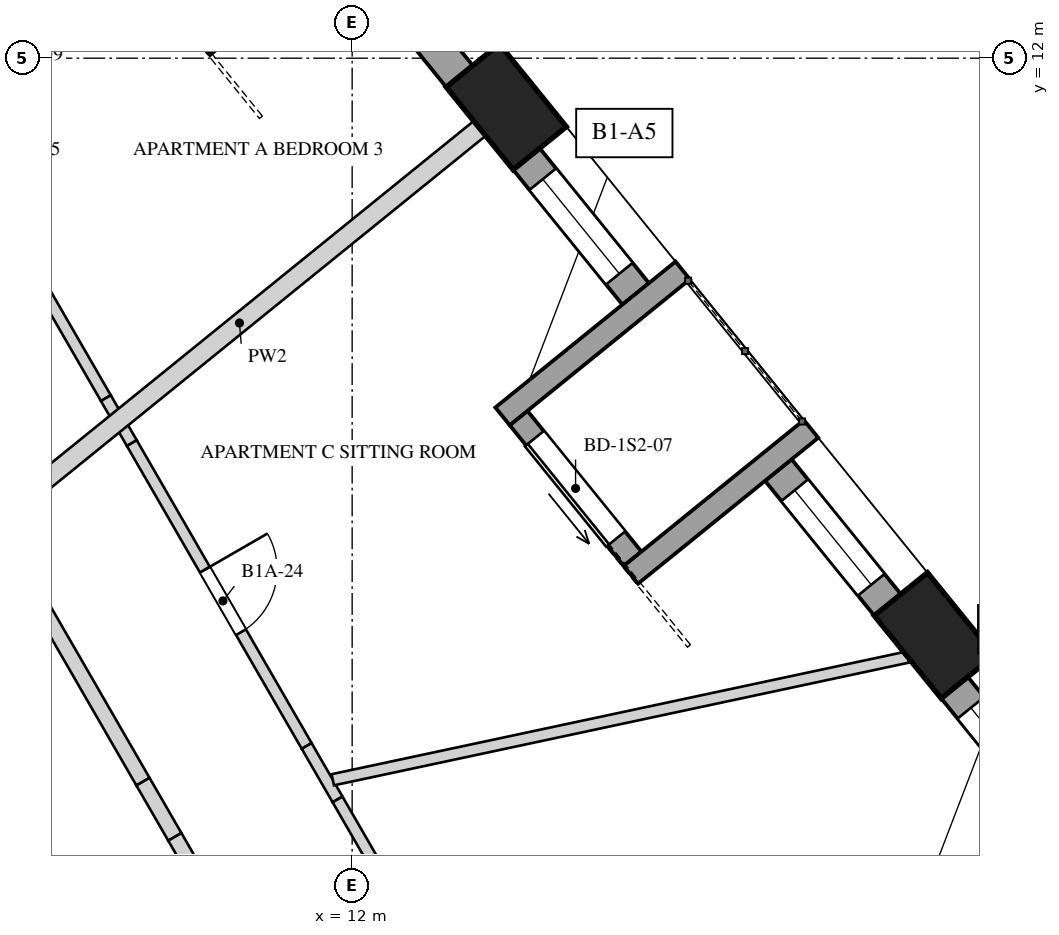
"""IFC4 building model, lengths in metres.
Left out: names, types, materials, properties, quantities, classifications, styles, units other than length and angle.
Written with IfcOpenShell. Run it as: python <this file> out.ifc"""

import sys

from ifc_helpers import new_model, si_unit, direction, frame, frame_2d, origin, origin_2d, place, context, subcontext, project, spatial, rectangle, extrude, element, fill, save


model = new_model("IFC4")
c1 = context("Model", 3, precision=1e-05, world=origin(), true_north=direction((0.0, 1.0)))
c2 = subcontext(c1, "Body", "Model", "MODEL_VIEW")
j1 = project(units=[si_unit("LENGTHUNIT", "METRE"), si_unit("PLANEANGLEUNIT", "RADIAN")], contexts=[c1])
p1 = place(None, origin())
s1 = spatial("IfcSite", under=j1, at=p1, CompositionType="ELEMENT")
p2 = place(p1, origin())
s2 = spatial("IfcBuilding", under=s1, at=p2, CompositionType="ELEMENT")
p3 = place(p2, frame((0.0, 0.0, 51.2)))
s3 = spatial("IfcBuildingStorey", under=s2, at=p3, CompositionType="ELEMENT", Elevation=51.2)
p4 = place(p3, frame((9.642, -4.25, 0.0), z_axis=(0.0, 0.0, 1.0), x_axis=(-0.499985955615, 0.866033512162, 0.0)))
e1 = element("IfcWall", 1, at=p4, inside=s3, PredefinedType="SHEAR", context=c2, shape_type="SweptSolid", body=[
    extrude(rectangle(XDim=17.003, YDim=1.05, at=frame_2d((8.501, 0.0))), origin(), (0.0, 0.0, 1.0), 4.0),
])
p5 = place(p4, frame((6.776, 0.0, 0.0)))
e2 = element("IfcOpeningElement", 2, at=p5, cuts=e1, PredefinedType="OPENING", context=c2, shape_type="SweptSolid", body=[
    extrude(rectangle(XDim=1.0, YDim=2.4, at=frame_2d((0.5, 1.2))), frame((0.0, 0.535, 0.0), z_axis=(0.0, -1.0, 0.0), x_axis=(1.0, 0.0, 0.0)), (0.0, 0.0, 1.0), 1.07),
])
for number, where, z_axis, x_axis in (
    (3, (19.659, 4.405, -0.35), (0.0, 0.0, 1.0), (-0.629, 0.777, 0.0)),
    (4, (14.028, 11.359, -0.35), (0.0, 0.0, 1.0), (-0.629, 0.777, 0.0)),
):
    element("IfcColumn", number, at=place(p3, frame(where, z_axis=z_axis, x_axis=x_axis)), inside=s3, PredefinedType="COLUMN", context=c2, shape_type="SweptSolid", body=[
        extrude(rectangle(XDim=1.4, YDim=0.9, at=origin_2d()), origin(), (0.0, 0.0, 1.0), 4.35),
    ])
p6 = place(p3, frame((21.362, 1.945, 0.0), z_axis=(0.0, 0.0, 1.0), x_axis=(-0.629339730135, 0.777130300576, 0.0)))
e5 = element("IfcWall", 5, at=p6, inside=s3, PredefinedType="SOLIDWALL", context=c2, shape_type="SweptSolid", body=[
    extrude(rectangle(XDim=2.283, YDim=0.45, at=frame_2d((1.142, 0.0))), origin(), (0.0, 0.0, 1.0), 3.3),
])
p7 = place(p6, frame((0.342, 0.0, 0.7)))
e6 = element("IfcOpeningElement", 6, at=p7, cuts=e5, PredefinedType="OPENING", context=c2, shape_type="SweptSolid", body=[
    extrude(rectangle(XDim=1.6, YDim=2.3, at=frame_2d((0.8, 1.15))), frame((0.0, 0.235, 0.0), z_axis=(0.0, -1.0, 0.0), x_axis=(1.0, 0.0, 0.0)), (0.0, 0.0, 1.0), 0.47),
])
p8 = place(p3, frame((19.044, 4.807, 0.0), z_axis=(0.0, 0.0, 1.0), x_axis=(-0.629339730135, 0.777130300576, 0.0)))
e7 = element("IfcWall", 7, at=p8, inside=s3, PredefinedType="SOLIDWALL", context=c2, shape_type="SweptSolid", body=[
    extrude(rectangle(XDim=2.283, YDim=0.45, at=frame_2d((1.142, 0.0))), origin(), (0.0, 0.0, 1.0), 3.3),
])
p9 = place(p8, frame((0.342, 0.0, 0.7)))
e8 = element("IfcOpeningElement", 8, at=p9, cuts=e7, PredefinedType="OPENING", context=c2, shape_type="SweptSolid", body=[
    extrude(rectangle(XDim=1.6, YDim=2.3, at=frame_2d((0.8, 1.15))), frame((0.0, 0.235, 0.0), z_axis=(0.0, -1.0, 0.0), x_axis=(1.0, 0.0, 0.0)), (0.0, 0.0, 1.0), 0.47),
])
p10 = place(p3, frame((15.73, 8.899, 0.0), z_axis=(0.0, 0.0, 1.0), x_axis=(-0.629339730135, 0.777130300576, 0.0)))
e9 = element("IfcWall", 9, at=p10, inside=s3, PredefinedType="SOLIDWALL", context=c2, shape_type="SweptSolid", body=[
    extrude(rectangle(XDim=2.283, YDim=0.45, at=frame_2d((1.142, 0.0))), origin(), (0.0, 0.0, 1.0), 3.3),
])
p11 = place(p10, frame((0.342, 0.0, 0.7)))
e10 = element("IfcOpeningElement", 10, at=p11, cuts=e9, PredefinedType="OPENING", context=c2, shape_type="SweptSolid", body=[
    extrude(rectangle(XDim=1.6, YDim=2.3, at=frame_2d((0.8, 1.15))), frame((0.0, 0.235, 0.0), z_axis=(0.0, -1.0, 0.0), x_axis=(1.0, 0.0, 0.0)), (0.0, 0.0, 1.0), 0.47),
])
p12 = place(p3, frame((13.412, 11.762, 0.0), z_axis=(0.0, 0.0, 1.0), x_axis=(-0.629339730135, 0.777130300576, 0.0)))
e11 = element("IfcWall", 11, at=p12, inside=s3, PredefinedType="SOLIDWALL", context=c2, shape_type="SweptSolid", body=[
    extrude(rectangle(XDim=2.283, YDim=0.45, at=frame_2d((1.142, 0.0))), origin(), (0.0, 0.0, 1.0), 3.3),
])
p13 = place(p12, frame((0.642, 0.0, 0.7)))
e12 = element("IfcOpeningElement", 12, at=p13, cuts=e11, PredefinedType="OPENING", context=c2, shape_type="SweptSolid", body=[
    extrude(rectangle(XDim=1.0, YDim=2.3, at=frame_2d((0.5, 1.15))), frame((0.0, 0.235, 0.0), z_axis=(0.0, -1.0, 0.0), x_axis=(1.0, 0.0, 0.0)), (0.0, 0.0, 1.0), 0.47),
])
p14 = place(p3, frame((21.98, 2.253, 0.0), z_axis=(0.0, 0.0, 1.0), x_axis=(-0.777121820661, -0.629350201281, 0.0)))
e13 = element("IfcWall", 13, at=p14, inside=s3, PredefinedType="SOLIDWALL", context=c2, shape_type="SweptSolid", body=[
    extrude(rectangle(XDim=3.05, YDim=0.3, at=frame_2d((1.525, 0.0))), origin(), (0.0, 0.0, 1.0), 3.3),
])
p15 = place(p3, frame((15.689, 5.414, 0.0), z_axis=(0.0, 0.0, 1.0), x_axis=(-0.629319049918, 0.777147047482, 0.0)))
e14 = element("IfcWall", 14, at=p15, inside=s3, PredefinedType="SOLIDWALL", context=c2, shape_type="SweptSolid", body=[
    extrude(rectangle(XDim=2.383, YDim=0.3, at=frame_2d((1.191, 0.0))), origin(), (0.0, 0.0, 1.0), 3.3),
])
p16 = place(p15, frame((0.342, 0.0, 0.0)))
e15 = element("IfcOpeningElement", 15, at=p16, cuts=e14, PredefinedType="OPENING", context=c2, shape_type="SweptSolid", body=[
    extrude(rectangle(XDim=1.7, YDim=2.4, at=frame_2d((0.85, 1.2))), frame((0.0, 0.16, 0.0), z_axis=(0.0, -1.0, 0.0), x_axis=(1.0, 0.0, 0.0)), (0.0, 0.0, 1.0), 0.32),
])
for number, where, z_axis, x_axis in (
    (16, (18.037, 7.123, 0.0), (0.0, 0.0, 1.0), (-0.777, -0.629, 0.0)),
    (17, (16.349, 9.208, 0.0), (0.0, 0.0, 1.0), (-0.777, -0.629, 0.0)),
    (18, (12.406, 14.077, 0.0), (0.0, 0.0, 1.0), (-0.777, -0.629, 0.0)),
):
    element("IfcWall", number, at=place(p3, frame(where, z_axis=z_axis, x_axis=x_axis)), inside=s3, PredefinedType="SOLIDWALL", context=c2, shape_type="SweptSolid", body=[
        extrude(rectangle(XDim=3.05, YDim=0.3, at=frame_2d((1.525, 0.0))), origin(), (0.0, 0.0, 1.0), 3.3),
    ])
p17 = place(p3, frame((6.038, 12.241, 0.0), z_axis=(0.0, 0.0, 1.0), x_axis=(0.500003308737, -0.866023493476, 0.0)))
e19 = element("IfcWall", 19, at=p17, inside=s3, PredefinedType="PARTITIONING", context=c2, shape_type="SweptSolid", body=[
    extrude(rectangle(XDim=5.443, YDim=0.15, at=frame_2d((2.721, 0.0))), origin(), (0.0, 0.0, 1.0), 3.65),
])
p18 = place(p17, frame((1.64, 0.0, 0.0)))
e20 = element("IfcOpeningElement", 20, at=p18, cuts=e19, PredefinedType="OPENING", context=c2, shape_type="SweptSolid", body=[
    extrude(rectangle(XDim=0.95, YDim=2.4, at=frame_2d((0.475, 1.2))), frame((0.0, 0.085, 0.0), z_axis=(0.0, -1.0, 0.0), x_axis=(1.0, 0.0, 0.0)), (0.0, 0.0, 1.0), 0.17),
])
p19 = place(p3, frame((8.76, 7.528, 0.0), z_axis=(0.0, 0.0, 1.0), x_axis=(0.499712146016, -0.866191532586, 0.0)))
e21 = element("IfcWall", 21, at=p19, inside=s3, PredefinedType="PARTITIONING", context=c2, shape_type="SweptSolid", body=[
    extrude(rectangle(XDim=0.684, YDim=0.15, at=frame_2d((0.342, 0.0))), origin(), (0.0, 0.0, 1.0), 2.95),
])
p20 = place(p3, frame((9.101, 6.936, 0.0), z_axis=(0.0, 0.0, 1.0), x_axis=(0.500008794324, -0.866020326319, 0.0)))
e22 = element("IfcWall", 22, at=p20, inside=s3, PredefinedType="PARTITIONING", context=c2, shape_type="SweptSolid", body=[
    extrude(rectangle(XDim=4.601, YDim=0.15, at=frame_2d((2.3, 0.0))), origin(), (0.0, 0.0, 1.0), 3.65),
])
p21 = place(p20, frame((1.922, 0.0, 0.0)))
e23 = element("IfcOpeningElement", 23, at=p21, cuts=e22, PredefinedType="OPENING", context=c2, shape_type="SweptSolid", body=[
    extrude(rectangle(XDim=0.95, YDim=2.4, at=frame_2d((0.475, 1.2))), frame((0.0, 0.085, 0.0), z_axis=(0.0, -1.0, 0.0), x_axis=(1.0, 0.0, 0.0)), (0.0, 0.0, 1.0), 0.17),
])
p22 = place(p3, frame((11.402, 2.952, 0.0), z_axis=(0.0, 0.0, 1.0), x_axis=(0.500147393723, -0.865940289253, 0.0)))
e24 = element("IfcWall", 24, at=p22, inside=s3, PredefinedType="PARTITIONING", context=c2, shape_type="SweptSolid", body=[
    extrude(rectangle(XDim=0.812, YDim=0.15, at=frame_2d((0.406, 0.0))), origin(), (0.0, 0.0, 1.0), 2.75),
])
p23 = place(p3, frame((11.808, 2.248, 0.0), z_axis=(0.0, 0.0, 1.0), x_axis=(0.500002145574, -0.866024165033, 0.0)))
e25 = element("IfcWall", 25, at=p23, inside=s3, PredefinedType="PARTITIONING", context=c2, shape_type="SweptSolid", body=[
    extrude(rectangle(XDim=3.677, YDim=0.15, at=frame_2d((1.839, 0.0))), origin(), (0.0, 0.0, 1.0), 3.65),
])
p24 = place(p23, frame((1.604, 0.0, 0.0)))
e26 = element("IfcOpeningElement", 26, at=p24, cuts=e25, PredefinedType="OPENING", context=c2, shape_type="SweptSolid", body=[
    extrude(rectangle(XDim=0.95, YDim=2.4, at=frame_2d((0.475, 1.2))), frame((0.0, 0.085, 0.0), z_axis=(0.0, -1.0, 0.0), x_axis=(1.0, 0.0, 0.0)), (0.0, 0.0, 1.0), 0.17),
])
p25 = place(p3, frame((11.745, 2.507, 0.0), z_axis=(0.0, 0.0, 1.0), x_axis=(0.97797299527, 0.208731455516, 0.0)))
e27 = element("IfcWall", 27, at=p25, inside=s3, PredefinedType="PARTITIONING", context=c2, shape_type="SweptSolid", body=[
    extrude(rectangle(XDim=7.735, YDim=0.15, at=frame_2d((3.867, 0.0))), origin(), (0.0, 0.0, 1.0), 2.75),
])
p26 = place(p3, frame((13.678, 11.076, 0.0), z_axis=(0.0, 0.0, 1.0), x_axis=(-0.777150492193, -0.629314796015, 0.0)))
e28 = element("IfcWall", 28, at=p26, inside=s3, PredefinedType="SOLIDWALL", context=c2, shape_type="SweptSolid", body=[
    extrude(rectangle(XDim=8.133, YDim=0.25, at=frame_2d((4.067, 0.0))), origin(), (0.0, 0.0, 1.0), 2.95),
])
p27 = place(p3, frame((7.455, 5.587, 0.0), z_axis=(0.0, 0.0, 1.0), x_axis=(0.500013241293, -0.866017758786, 0.0)))
e29 = element("IfcWall", 29, at=p27, inside=s3, PredefinedType="SOLIDWALL", context=c2, shape_type="SweptSolid", body=[
    extrude(rectangle(XDim=3.585, YDim=0.2, at=frame_2d((1.793, 0.0))), origin(), (0.0, 0.0, 1.0), 3.65),
])
p28 = place(p3, frame((9.248, 2.482, 0.0), z_axis=(0.0, 0.0, 1.0), x_axis=(0.500117447933, -0.865957584569, 0.0)))
e30 = element("IfcWall", 30, at=p28, inside=s3, PredefinedType="SOLIDWALL", context=c2, shape_type="SweptSolid", body=[
    extrude(rectangle(XDim=0.838, YDim=0.2, at=frame_2d((0.419, 0.0))), origin(), (0.0, 0.0, 1.0), 2.75),
])
p29 = place(p3, frame((9.667, 1.756, 0.0), z_axis=(0.0, 0.0, 1.0), x_axis=(0.499964529649, -0.866045881633, 0.0)))
e31 = element("IfcWall", 31, at=p29, inside=s3, PredefinedType="SOLIDWALL", context=c2, shape_type="SweptSolid", body=[
    extrude(rectangle(XDim=2.794, YDim=0.2, at=frame_2d((1.397, 0.0))), origin(), (0.0, 0.0, 1.0), 3.65),
])
p30 = place(p7, origin())
e32 = element("IfcWindow", 32, at=p30, inside=s3, PartitioningType="SINGLE_PANEL", PredefinedType="WINDOW", context=c2, shape_type="SweptSolid", body=[
    extrude(rectangle(XDim=1.6, YDim=2.3, at=frame_2d((0.8, 1.15))), frame((0.0, 0.03, 0.0), z_axis=(0.0, -1.0, 0.0), x_axis=(1.0, 0.0, 0.0)), (0.0, 0.0, 1.0), 0.06),
])
fill(e6, e32)
p31 = place(p9, origin())
e33 = element("IfcWindow", 33, at=p31, inside=s3, PartitioningType="SINGLE_PANEL", PredefinedType="WINDOW", context=c2, shape_type="SweptSolid", body=[
    extrude(rectangle(XDim=1.6, YDim=2.3, at=frame_2d((0.8, 1.15))), frame((0.0, 0.03, 0.0), z_axis=(0.0, -1.0, 0.0), x_axis=(1.0, 0.0, 0.0)), (0.0, 0.0, 1.0), 0.06),
])
fill(e8, e33)
p32 = place(p11, origin())
e34 = element("IfcWindow", 34, at=p32, inside=s3, PartitioningType="SINGLE_PANEL", PredefinedType="WINDOW", context=c2, shape_type="SweptSolid", body=[
    extrude(rectangle(XDim=1.6, YDim=2.3, at=frame_2d((0.8, 1.15))), frame((0.0, 0.03, 0.0), z_axis=(0.0, -1.0, 0.0), x_axis=(1.0, 0.0, 0.0)), (0.0, 0.0, 1.0), 0.06),
])
fill(e10, e34)
p33 = place(p16, origin())
e35 = element("IfcDoor", 35, at=p33, inside=s3, OperationType="SLIDING_TO_LEFT", PredefinedType="DOOR", context=c2, shape_type="SweptSolid", body=[
    extrude(rectangle(XDim=1.7, YDim=2.4, at=frame_2d((0.85, 1.2))), frame((0.0, 0.025, 0.0), z_axis=(0.0, -1.0, 0.0), x_axis=(1.0, 0.0, 0.0)), (0.0, 0.0, 1.0), 0.05),
])
fill(e15, e35)
p34 = place(p21, origin())
e36 = element("IfcDoor", 36, at=p34, inside=s3, OperationType="SINGLE_SWING_RIGHT", PredefinedType="DOOR", context=c2, shape_type="SweptSolid", body=[
    extrude(rectangle(XDim=0.95, YDim=2.4, at=frame_2d((0.475, 1.2))), frame((0.0, 0.025, 0.0), z_axis=(0.0, -1.0, 0.0), x_axis=(1.0, 0.0, 0.0)), (0.0, 0.0, 1.0), 0.05),
])
fill(e23, e36)
save(model, sys.argv[1])
